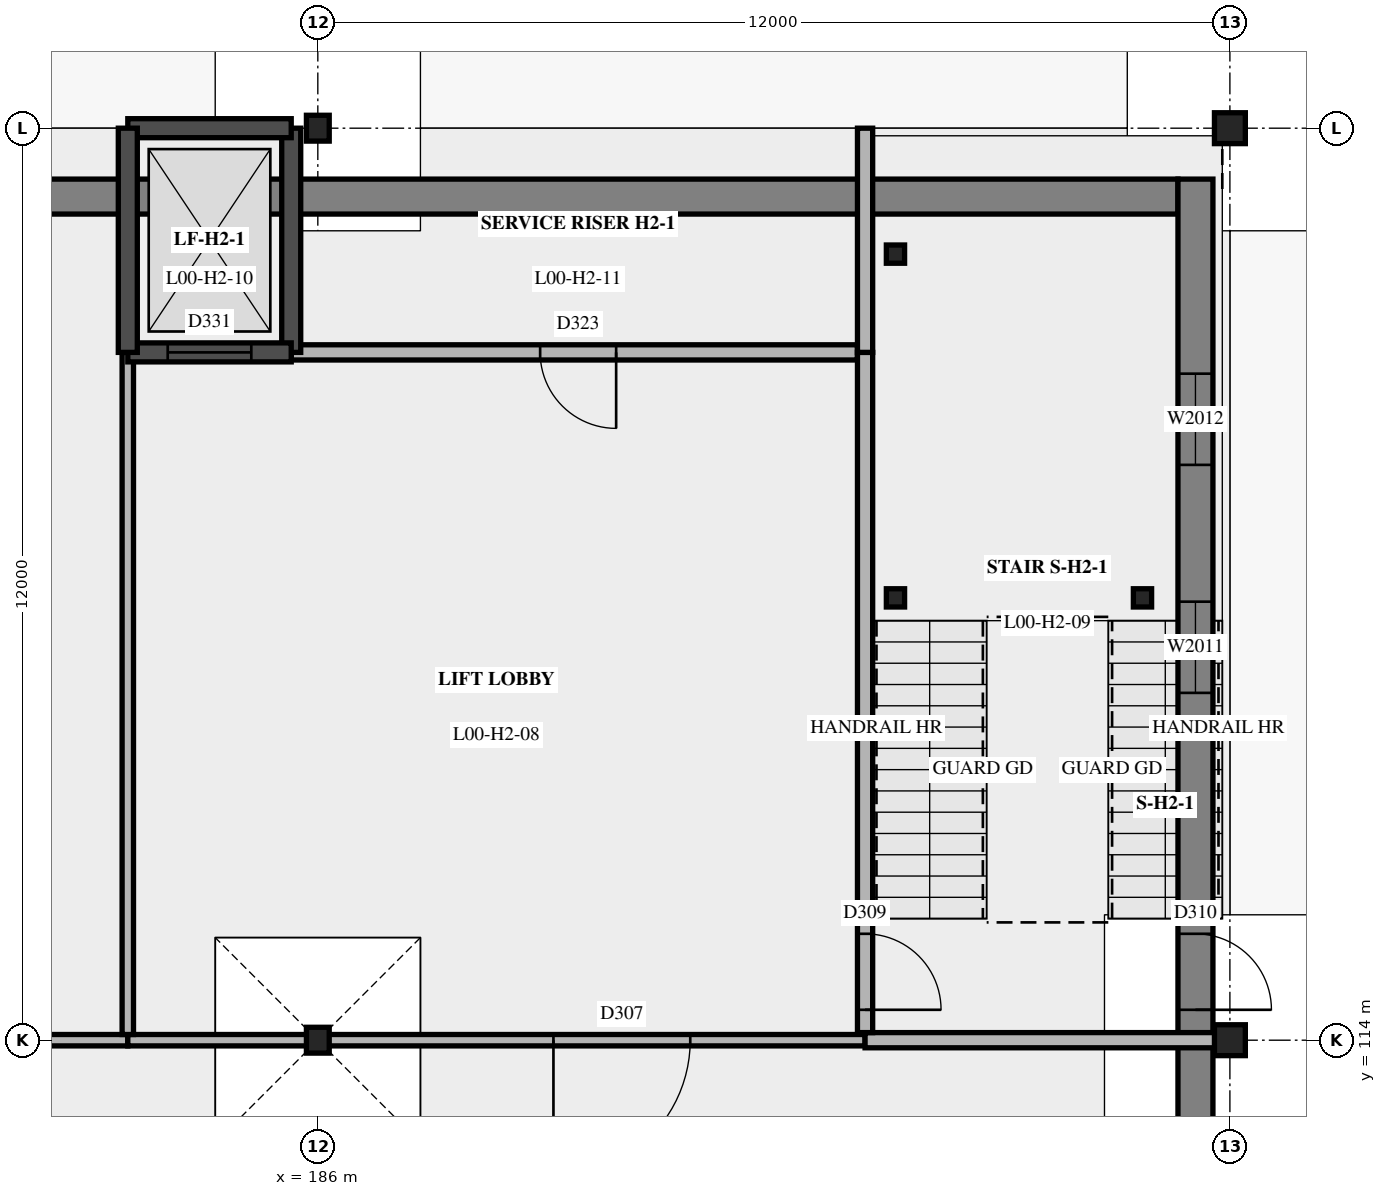
"""IFC4 building model, lengths in metres.
Left out: names, types, materials, properties, quantities, classifications, styles, units other than length and angle.
Written with IfcOpenShell. Run it as: python <this file> out.ifc"""

import sys

from ifc_helpers import new_model, si_unit, direction, frame, frame_2d, origin, origin_2d, place, context, subcontext, project, spatial, rectangle, hollow_circle, i_section, extrude, element, fill, save


model = new_model("IFC4")
c1 = context("Model", 3, precision=1e-05, world=origin(), true_north=direction((0.0, 1.0)))
c2 = subcontext(c1, "Body", "Model", "MODEL_VIEW")
j1 = project(units=[si_unit("LENGTHUNIT", "METRE"), si_unit("PLANEANGLEUNIT", "RADIAN")], contexts=[c1])
p1 = place(None, origin())
s1 = spatial("IfcSite", under=j1, at=p1, CompositionType="ELEMENT")
p2 = place(p1, origin())
s2 = spatial("IfcBuilding", under=s1, at=p2, CompositionType="ELEMENT")
p3 = place(p2, origin())
s3 = spatial("IfcBuildingStorey", under=s2, at=p3, CompositionType="ELEMENT", Elevation=0.0)
for number, where, z_axis, x_axis in (
    (1, (198.0, 114.0, 0.0), (0.0, 0.0, 1.0), (1.0, 0.0, 0.0)),
    (2, (198.0, 126.0, 0.0), (0.0, 0.0, 1.0), (1.0, 0.0, 0.0)),
):
    element("IfcColumn", number, at=place(p3, frame(where, z_axis=z_axis, x_axis=x_axis)), inside=s3, PredefinedType="COLUMN", context=c2, shape_type="SweptSolid", body=[
        extrude(hollow_circle(Radius=0.203, WallThickness=0.016, at=origin_2d()), origin(), (0.0, 0.0, 1.0), 5.4),
    ])
for number, where, z_axis, x_axis in (
    (3, (186.0, 114.0, 0.0), (0.0, 0.0, 1.0), (1.0, 0.0, 0.0)),
    (4, (186.0, 126.0, 0.0), (0.0, 0.0, 1.0), (1.0, 0.0, 0.0)),
):
    element("IfcColumn", number, at=place(p3, frame(where, z_axis=z_axis, x_axis=x_axis)), inside=s3, PredefinedType="COLUMN", context=c2, shape_type="SweptSolid", body=[
        extrude(i_section(OverallWidth=0.3, OverallDepth=0.34, WebThickness=0.012, FlangeThickness=0.021, at=origin_2d()), origin(), (0.0, 0.0, 1.0), 4.65),
    ])
p4 = place(p3, frame((150.683, 125.1, 0.0), z_axis=(0.0, 0.0, 1.0), x_axis=(1.0, 0.0, 0.0)))
e5 = element("IfcWall", 5, at=p4, inside=s3, PredefinedType="SOLIDWALL", context=c2, shape_type="SweptSolid", body=[
    extrude(rectangle(XDim=46.634, YDim=0.46, at=frame_2d((23.317, 0.0))), origin(), (0.0, 0.0, 1.0), 5.4),
])
p5 = place(p4, frame((9.9, 0.0, 0.9)))
e6 = element("IfcOpeningElement", 6, at=p5, cuts=e5, PredefinedType="OPENING", context=c2, shape_type="SweptSolid", body=[
    extrude(rectangle(XDim=1.2, YDim=3.3, at=frame_2d((0.6, 1.65))), frame((0.0, 0.24, 0.0), z_axis=(0.0, -1.0, 0.0), x_axis=(1.0, 0.0, 0.0)), (0.0, 0.0, 1.0), 0.48),
])
p6 = place(p4, frame((15.9, 0.0, 0.9)))
e7 = element("IfcOpeningElement", 7, at=p6, cuts=e5, PredefinedType="OPENING", context=c2, shape_type="SweptSolid", body=[
    extrude(rectangle(XDim=1.2, YDim=3.3, at=frame_2d((0.6, 1.65))), frame((0.0, 0.24, 0.0), z_axis=(0.0, -1.0, 0.0), x_axis=(1.0, 0.0, 0.0)), (0.0, 0.0, 1.0), 0.48),
])
p7 = place(p4, frame((18.9, 0.0, 0.9)))
e8 = element("IfcOpeningElement", 8, at=p7, cuts=e5, PredefinedType="OPENING", context=c2, shape_type="SweptSolid", body=[
    extrude(rectangle(XDim=1.2, YDim=3.3, at=frame_2d((0.6, 1.65))), frame((0.0, 0.24, 0.0), z_axis=(0.0, -1.0, 0.0), x_axis=(1.0, 0.0, 0.0)), (0.0, 0.0, 1.0), 0.48),
])
p8 = place(p4, frame((21.9, 0.0, 0.9)))
e9 = element("IfcOpeningElement", 9, at=p8, cuts=e5, PredefinedType="OPENING", context=c2, shape_type="SweptSolid", body=[
    extrude(rectangle(XDim=1.2, YDim=3.3, at=frame_2d((0.6, 1.65))), frame((0.0, 0.24, 0.0), z_axis=(0.0, -1.0, 0.0), x_axis=(1.0, 0.0, 0.0)), (0.0, 0.0, 1.0), 0.48),
])
p9 = place(p4, frame((24.9, 0.0, 0.9)))
e10 = element("IfcOpeningElement", 10, at=p9, cuts=e5, PredefinedType="OPENING", context=c2, shape_type="SweptSolid", body=[
    extrude(rectangle(XDim=1.2, YDim=3.3, at=frame_2d((0.6, 1.65))), frame((0.0, 0.24, 0.0), z_axis=(0.0, -1.0, 0.0), x_axis=(1.0, 0.0, 0.0)), (0.0, 0.0, 1.0), 0.48),
])
p10 = place(p4, frame((27.9, 0.0, 0.9)))
e11 = element("IfcOpeningElement", 11, at=p10, cuts=e5, PredefinedType="OPENING", context=c2, shape_type="SweptSolid", body=[
    extrude(rectangle(XDim=1.2, YDim=3.3, at=frame_2d((0.6, 1.65))), frame((0.0, 0.24, 0.0), z_axis=(0.0, -1.0, 0.0), x_axis=(1.0, 0.0, 0.0)), (0.0, 0.0, 1.0), 0.48),
])
p11 = place(p3, frame((197.547, 78.67, 0.0), z_axis=(0.0, 0.0, 1.0), x_axis=(0.0, 1.0, 0.0)))
e12 = element("IfcWall", 12, at=p11, inside=s3, PredefinedType="SOLIDWALL", context=c2, shape_type="SweptSolid", body=[
    extrude(rectangle(XDim=46.66, YDim=0.46, at=frame_2d((23.33, 0.0))), origin(), (0.0, 0.0, 1.0), 5.4),
])
p12 = place(p11, frame((36.73, 0.0, 0.0), z_axis=(0.0, 0.0, 1.0), x_axis=(-1.0, 0.0, 0.0)))
e13 = element("IfcOpeningElement", 13, at=p12, cuts=e12, PredefinedType="OPENING", context=c2, shape_type="SweptSolid", body=[
    extrude(rectangle(XDim=1.0, YDim=2.1, at=frame_2d((0.5, 1.05))), frame((0.0, 0.24, 0.0), z_axis=(0.0, -1.0, 0.0), x_axis=(1.0, 0.0, 0.0)), (0.0, 0.0, 1.0), 0.48),
])
p13 = place(p11, frame((3.73, 0.0, 0.0)))
e14 = element("IfcOpeningElement", 14, at=p13, cuts=e12, PredefinedType="OPENING", context=c2, shape_type="SweptSolid", body=[
    extrude(rectangle(XDim=3.2, YDim=3.6, at=frame_2d((1.6, 1.8))), frame((0.0, 0.24, 0.0), z_axis=(0.0, -1.0, 0.0), x_axis=(1.0, 0.0, 0.0)), (0.0, 0.0, 1.0), 0.48),
])
p14 = place(p11, frame((15.73, 0.0, 0.0)))
e15 = element("IfcOpeningElement", 15, at=p14, cuts=e12, PredefinedType="OPENING", context=c2, shape_type="SweptSolid", body=[
    extrude(rectangle(XDim=3.2, YDim=3.6, at=frame_2d((1.6, 1.8))), frame((0.0, 0.24, 0.0), z_axis=(0.0, -1.0, 0.0), x_axis=(1.0, 0.0, 0.0)), (0.0, 0.0, 1.0), 0.48),
])
p15 = place(p11, frame((27.73, 0.0, 0.0)))
e16 = element("IfcOpeningElement", 16, at=p15, cuts=e12, PredefinedType="OPENING", context=c2, shape_type="SweptSolid", body=[
    extrude(rectangle(XDim=3.2, YDim=3.6, at=frame_2d((1.6, 1.8))), frame((0.0, 0.24, 0.0), z_axis=(0.0, -1.0, 0.0), x_axis=(1.0, 0.0, 0.0)), (0.0, 0.0, 1.0), 0.48),
])
p16 = place(p11, frame((8.83, 0.0, 0.0), z_axis=(0.0, 0.0, 1.0), x_axis=(-1.0, 0.0, 0.0)))
e17 = element("IfcOpeningElement", 17, at=p16, cuts=e12, PredefinedType="OPENING", context=c2, shape_type="SweptSolid", body=[
    extrude(rectangle(XDim=1.0, YDim=2.1, at=frame_2d((0.5, 1.05))), frame((0.0, 0.24, 0.0), z_axis=(0.0, -1.0, 0.0), x_axis=(1.0, 0.0, 0.0)), (0.0, 0.0, 1.0), 0.48),
])
p17 = place(p11, frame((26.83, 0.0, 0.0), z_axis=(0.0, 0.0, 1.0), x_axis=(-1.0, 0.0, 0.0)))
e18 = element("IfcOpeningElement", 18, at=p17, cuts=e12, PredefinedType="OPENING", context=c2, shape_type="SweptSolid", body=[
    extrude(rectangle(XDim=1.0, YDim=2.1, at=frame_2d((0.5, 1.05))), frame((0.0, 0.24, 0.0), z_axis=(0.0, -1.0, 0.0), x_axis=(1.0, 0.0, 0.0)), (0.0, 0.0, 1.0), 0.48),
])
p18 = place(p11, frame((39.9, 0.0, 0.9)))
e19 = element("IfcOpeningElement", 19, at=p18, cuts=e12, PredefinedType="OPENING", context=c2, shape_type="SweptSolid", body=[
    extrude(rectangle(XDim=1.2, YDim=3.3, at=frame_2d((0.6, 1.65))), frame((0.0, 0.24, 0.0), z_axis=(0.0, -1.0, 0.0), x_axis=(1.0, 0.0, 0.0)), (0.0, 0.0, 1.0), 0.48),
])
p19 = place(p11, frame((42.9, 0.0, 0.9)))
e20 = element("IfcOpeningElement", 20, at=p19, cuts=e12, PredefinedType="OPENING", context=c2, shape_type="SweptSolid", body=[
    extrude(rectangle(XDim=1.2, YDim=3.3, at=frame_2d((0.6, 1.65))), frame((0.0, 0.24, 0.0), z_axis=(0.0, -1.0, 0.0), x_axis=(1.0, 0.0, 0.0)), (0.0, 0.0, 1.0), 0.48),
])
p20 = place(p3, frame((165.0, 114.0, 0.0), z_axis=(0.0, 0.0, 1.0), x_axis=(1.0, 0.0, 0.0)))
e21 = element("IfcWall", 21, at=p20, inside=s3, PredefinedType="PARTITIONING", context=c2, shape_type="SweptSolid", body=[
    extrude(rectangle(XDim=18.5, YDim=0.15, at=frame_2d((9.25, 0.0))), origin(), (0.0, 0.0, 1.0), 4.65),
])
p21 = place(p20, frame((5.4, 0.0, 0.0)))
e22 = element("IfcOpeningElement", 22, at=p21, cuts=e21, PredefinedType="OPENING", context=c2, shape_type="SweptSolid", body=[
    extrude(rectangle(XDim=1.2, YDim=2.4, at=frame_2d((0.6, 1.2))), frame((0.0, 0.085, 0.0), z_axis=(0.0, -1.0, 0.0), x_axis=(1.0, 0.0, 0.0)), (0.0, 0.0, 1.0), 0.17),
])
p22 = place(p3, frame((183.5, 114.0, 0.0), z_axis=(0.0, 0.0, 1.0), x_axis=(1.0, 0.0, 0.0)))
e23 = element("IfcWall", 23, at=p22, inside=s3, PredefinedType="PARTITIONING", context=c2, shape_type="SweptSolid", body=[
    extrude(rectangle(XDim=9.7, YDim=0.15, at=frame_2d((4.85, 0.0))), origin(), (0.0, 0.0, 1.0), 4.65),
])
p23 = place(p22, frame((5.6, 0.0, 0.0)))
e24 = element("IfcOpeningElement", 24, at=p23, cuts=e23, PredefinedType="OPENING", context=c2, shape_type="SweptSolid", body=[
    extrude(rectangle(XDim=1.8, YDim=2.1, at=frame_2d((0.9, 1.05))), frame((0.0, 0.085, 0.0), z_axis=(0.0, -1.0, 0.0), x_axis=(1.0, 0.0, 0.0)), (0.0, 0.0, 1.0), 0.17),
])
p24 = place(p3, frame((193.2, 114.0, 0.0), z_axis=(0.0, 0.0, 1.0), x_axis=(1.0, 0.0, 0.0)))
e25 = element("IfcWall", 25, at=p24, inside=s3, PredefinedType="PARTITIONING", context=c2, shape_type="SweptSolid", body=[
    extrude(rectangle(XDim=4.8, YDim=0.2, at=frame_2d((2.4, 0.0))), origin(), (0.0, 0.0, 1.0), 4.65),
])
p25 = place(p3, frame((185.65, 123.05, 0.0), z_axis=(0.0, 0.0, 1.0), x_axis=(1.0, 0.0, 0.0)))
e26 = element("IfcWall", 26, at=p25, inside=s3, PredefinedType="PARTITIONING", context=c2, shape_type="SweptSolid", body=[
    extrude(rectangle(XDim=7.45, YDim=0.2, at=frame_2d((3.725, 0.0))), origin(), (0.0, 0.0, 1.0), 5.15),
])
p26 = place(p25, frame((3.275, 0.0, 0.0)))
e27 = element("IfcOpeningElement", 27, at=p26, cuts=e26, PredefinedType="OPENING", context=c2, shape_type="SweptSolid", body=[
    extrude(rectangle(XDim=1.0, YDim=2.1, at=frame_2d((0.5, 1.05))), frame((0.0, 0.11, 0.0), z_axis=(0.0, -1.0, 0.0), x_axis=(1.0, 0.0, 0.0)), (0.0, 0.0, 1.0), 0.22),
])
p27 = place(p3, frame((183.5, 114.075, 0.0), z_axis=(0.0, 0.0, 1.0), x_axis=(0.0, 1.0, 0.0)))
e28 = element("IfcWall", 28, at=p27, inside=s3, PredefinedType="PARTITIONING", context=c2, shape_type="SweptSolid", body=[
    extrude(rectangle(XDim=8.975, YDim=0.15, at=frame_2d((4.488, 0.0))), origin(), (0.0, 0.0, 1.0), 4.75),
])
p28 = place(p3, frame((193.2, 114.1, 0.0), z_axis=(0.0, 0.0, 1.0), x_axis=(0.0, 1.0, 0.0)))
e29 = element("IfcWall", 29, at=p28, inside=s3, PredefinedType="PARTITIONING", context=c2, shape_type="SweptSolid", body=[
    extrude(rectangle(XDim=8.95, YDim=0.2, at=frame_2d((4.475, 0.0))), origin(), (0.0, 0.0, 1.0), 5.15),
])
p29 = place(p28, frame((0.3, 0.0, 0.0)))
e30 = element("IfcOpeningElement", 30, at=p29, cuts=e29, PredefinedType="OPENING", context=c2, shape_type="SweptSolid", body=[
    extrude(rectangle(XDim=1.0, YDim=2.1, at=frame_2d((0.5, 1.05))), frame((0.0, 0.11, 0.0), z_axis=(0.0, -1.0, 0.0), x_axis=(1.0, 0.0, 0.0)), (0.0, 0.0, 1.0), 0.22),
])
p30 = place(p3, frame((193.2, 123.05, 0.0), z_axis=(0.0, 0.0, 1.0), x_axis=(0.0, 1.0, 0.0)))
e31 = element("IfcWall", 31, at=p30, inside=s3, PredefinedType="PARTITIONING", context=c2, shape_type="SweptSolid", body=[
    extrude(rectangle(XDim=2.95, YDim=0.2, at=frame_2d((1.475, 0.0))), origin(), (0.0, 0.0, 1.0), 5.15),
])
p31 = place(p3, frame((185.65, 123.05, -1.4), z_axis=(0.0, 0.0, 1.0), x_axis=(0.0, 1.0, 0.0)))
e32 = element("IfcWall", 32, at=p31, inside=s3, PredefinedType="SHEAR", context=c2, shape_type="SweptSolid", body=[
    extrude(rectangle(XDim=2.95, YDim=0.25, at=frame_2d((1.475, 0.0))), origin(), (0.0, 0.0, 1.0), 6.8),
])
p32 = place(p3, frame((185.65, 126.0, -1.4), z_axis=(0.0, 0.0, 1.0), x_axis=(-1.0, 0.0, 0.0)))
e33 = element("IfcWall", 33, at=p32, inside=s3, PredefinedType="SHEAR", context=c2, shape_type="SweptSolid", body=[
    extrude(rectangle(XDim=2.15, YDim=0.25, at=frame_2d((1.075, 0.0))), origin(), (0.0, 0.0, 1.0), 6.8),
])
p33 = place(p3, frame((183.5, 123.05, -1.4), z_axis=(0.0, 0.0, 1.0), x_axis=(1.0, 0.0, 0.0)))
e34 = element("IfcWall", 34, at=p33, inside=s3, PredefinedType="SHEAR", context=c2, shape_type="SweptSolid", body=[
    extrude(rectangle(XDim=2.15, YDim=0.25, at=frame_2d((1.075, 0.0))), origin(), (0.0, 0.0, 1.0), 6.8),
])
p34 = place(p33, frame((0.525, 0.0, 1.4)))
e35 = element("IfcOpeningElement", 35, at=p34, cuts=e34, PredefinedType="OPENING", context=c2, shape_type="SweptSolid", body=[
    extrude(rectangle(XDim=1.1, YDim=2.1, at=frame_2d((0.55, 1.05))), frame((0.0, 0.135, 0.0), z_axis=(0.0, -1.0, 0.0), x_axis=(1.0, 0.0, 0.0)), (0.0, 0.0, 1.0), 0.27),
])
p35 = place(p3, frame((183.5, 126.0, -1.4), z_axis=(0.0, 0.0, 1.0), x_axis=(0.0, -1.0, 0.0)))
e36 = element("IfcWall", 36, at=p35, inside=s3, PredefinedType="SHEAR", context=c2, shape_type="SweptSolid", body=[
    extrude(rectangle(XDim=2.95, YDim=0.25, at=frame_2d((1.475, 0.0))), origin(), (0.0, 0.0, 1.0), 6.8),
])
for number, where, z_axis, x_axis in (
    (37, (193.6, 119.82, 0.0), (0.0, 0.0, 1.0), (1.0, 0.0, 0.0)),
    (38, (193.6, 124.343, 0.0), (0.0, 0.0, 1.0), (1.0, 0.0, 0.0)),
    (39, (196.85, 119.82, 0.0), (0.0, 0.0, 1.0), (1.0, 0.0, 0.0)),
):
    element("IfcColumn", number, at=place(p3, frame(where, z_axis=z_axis, x_axis=x_axis)), inside=s3, PredefinedType="COLUMN", context=c2, shape_type="SweptSolid", body=[
        extrude(i_section(OverallWidth=0.24, OverallDepth=0.24, WebThickness=0.01, FlangeThickness=0.017, at=origin_2d()), origin(), (0.0, 0.0, 1.0), 2.5),
    ])
p36 = place(p12, origin())
e40 = element("IfcDoor", 40, at=p36, inside=s3, OperationType="SINGLE_SWING_RIGHT", PredefinedType="DOOR", context=c2, shape_type="SweptSolid", body=[
    extrude(rectangle(XDim=1.0, YDim=2.1, at=frame_2d((0.5, 1.05))), frame((0.0, 0.025, 0.0), z_axis=(0.0, -1.0, 0.0), x_axis=(1.0, 0.0, 0.0)), (0.0, 0.0, 1.0), 0.05),
])
fill(e13, e40)
p37 = place(p18, origin())
e41 = element("IfcWindow", 41, at=p37, inside=s3, PartitioningType="SINGLE_PANEL", PredefinedType="WINDOW", context=c2, shape_type="SweptSolid", body=[
    extrude(rectangle(XDim=1.2, YDim=3.3, at=frame_2d((0.6, 1.65))), frame((0.0, 0.03, 0.0), z_axis=(0.0, -1.0, 0.0), x_axis=(1.0, 0.0, 0.0)), (0.0, 0.0, 1.0), 0.06),
])
fill(e19, e41)
p38 = place(p19, origin())
e42 = element("IfcWindow", 42, at=p38, inside=s3, PartitioningType="SINGLE_PANEL", PredefinedType="WINDOW", context=c2, shape_type="SweptSolid", body=[
    extrude(rectangle(XDim=1.2, YDim=3.3, at=frame_2d((0.6, 1.65))), frame((0.0, 0.03, 0.0), z_axis=(0.0, -1.0, 0.0), x_axis=(1.0, 0.0, 0.0)), (0.0, 0.0, 1.0), 0.06),
])
fill(e20, e42)
p39 = place(p23, origin())
e43 = element("IfcDoor", 43, at=p39, inside=s3, OperationType="DOUBLE_DOOR_SINGLE_SWING", PredefinedType="DOOR", context=c2, shape_type="SweptSolid", body=[
    extrude(rectangle(XDim=1.8, YDim=2.1, at=frame_2d((0.9, 1.05))), frame((0.0, 0.025, 0.0), z_axis=(0.0, -1.0, 0.0), x_axis=(1.0, 0.0, 0.0)), (0.0, 0.0, 1.0), 0.05),
])
fill(e24, e43)
p40 = place(p29, origin())
e44 = element("IfcDoor", 44, at=p40, inside=s3, OperationType="SINGLE_SWING_RIGHT", PredefinedType="DOOR", context=c2, shape_type="SweptSolid", body=[
    extrude(rectangle(XDim=1.0, YDim=2.1, at=frame_2d((0.5, 1.05))), frame((0.0, 0.025, 0.0), z_axis=(0.0, -1.0, 0.0), x_axis=(1.0, 0.0, 0.0)), (0.0, 0.0, 1.0), 0.05),
])
fill(e30, e44)
p41 = place(p26, origin())
e45 = element("IfcDoor", 45, at=p41, inside=s3, OperationType="SINGLE_SWING_LEFT", PredefinedType="DOOR", context=c2, shape_type="SweptSolid", body=[
    extrude(rectangle(XDim=1.0, YDim=2.1, at=frame_2d((0.5, 1.05))), frame((0.0, 0.025, 0.0), z_axis=(0.0, -1.0, 0.0), x_axis=(1.0, 0.0, 0.0)), (0.0, 0.0, 1.0), 0.05),
])
fill(e27, e45)
p42 = place(p34, origin())
e46 = element("IfcDoor", 46, at=p42, inside=s3, OperationType="SLIDING_TO_LEFT", PredefinedType="DOOR", context=c2, shape_type="SweptSolid", body=[
    extrude(rectangle(XDim=1.1, YDim=2.1, at=frame_2d((0.55, 1.05))), frame((0.0, 0.025, 0.0), z_axis=(0.0, -1.0, 0.0), x_axis=(1.0, 0.0, 0.0)), (0.0, 0.0, 1.0), 0.05),
])
fill(e35, e46)
save(model, sys.argv[1])
